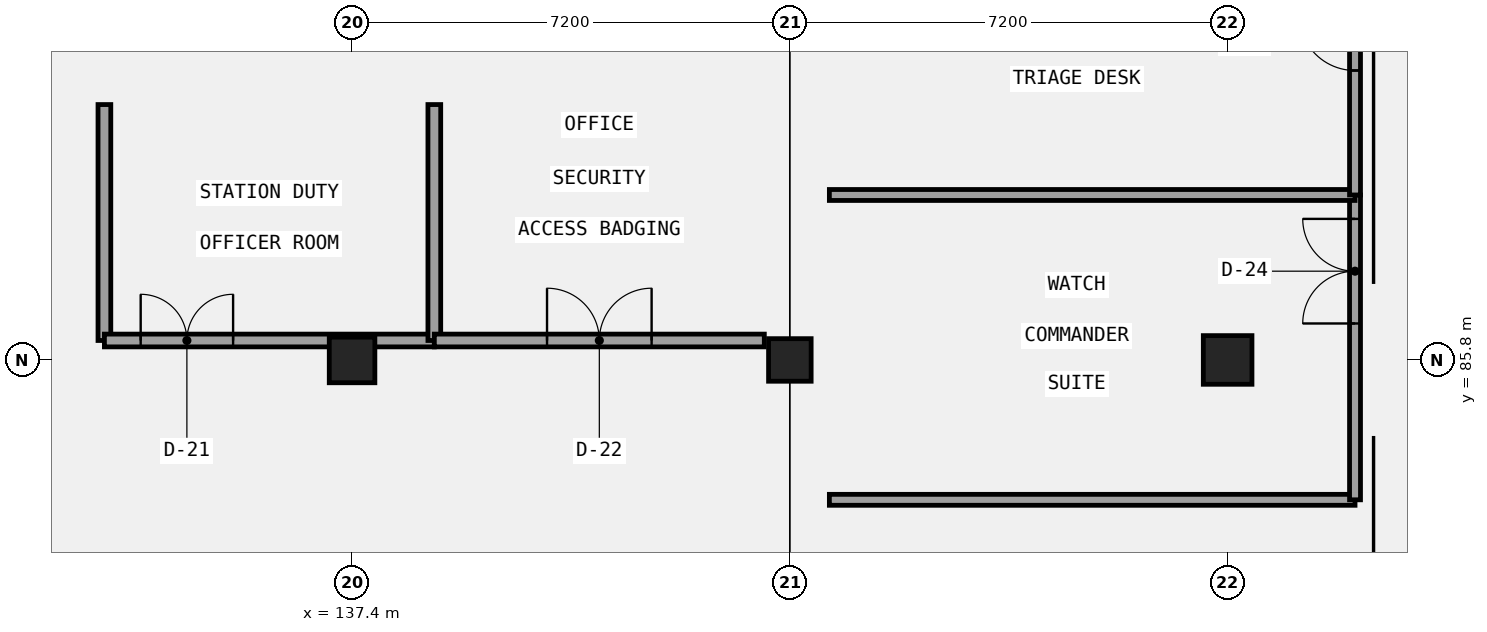
"""IFC4 building model, lengths in metres.
Left out: names, types, materials, properties, quantities, classifications, styles, units other than length and angle.
Written with IfcOpenShell. Run it as: python <this file> out.ifc"""

import sys

from ifc_helpers import new_model, si_unit, direction, frame, frame_2d, origin, origin_2d, place, context, subcontext, project, spatial, rectangle, extrude, element, fill, save


model = new_model("IFC4")
c1 = context("Model", 3, precision=1e-05, world=origin(), true_north=direction((0.0, 1.0)))
c2 = subcontext(c1, "Body", "Model", "MODEL_VIEW")
j1 = project(units=[si_unit("LENGTHUNIT", "METRE"), si_unit("PLANEANGLEUNIT", "RADIAN")], contexts=[c1])
p1 = place(None, origin())
s1 = spatial("IfcSite", under=j1, at=p1, CompositionType="ELEMENT")
p2 = place(p1, origin())
s2 = spatial("IfcBuilding", under=s1, at=p2, CompositionType="ELEMENT")
p3 = place(p2, origin())
s3 = spatial("IfcBuildingStorey", under=s2, at=p3, CompositionType="ELEMENT", Elevation=0.0)
p4 = place(p3, frame((137.4, 85.8, 0.0), z_axis=(0.0, 0.0, 1.0), x_axis=(1.0, 0.0, 0.0)))
e1 = element("IfcColumn", 1, at=p4, inside=s3, PredefinedType="COLUMN", context=c2, shape_type="SweptSolid", body=[
    extrude(rectangle(XDim=0.75, YDim=0.75, at=origin_2d()), origin(), (0.0, 0.0, 1.0), 5.4),
])
p5 = place(p3, frame((144.6, 85.8, 0.0), z_axis=(0.0, 0.0, 1.0), x_axis=(1.0, 0.0, 0.0)))
e2 = element("IfcColumn", 2, at=p5, inside=s3, PredefinedType="COLUMN", context=c2, shape_type="SweptSolid", body=[
    extrude(rectangle(XDim=0.7, YDim=0.7, at=origin_2d()), origin(), (0.0, 0.0, 1.0), 5.4),
])
p6 = place(p3, frame((151.8, 85.8, 0.0), z_axis=(0.0, 0.0, 1.0), x_axis=(1.0, 0.0, 0.0)))
e3 = element("IfcColumn", 3, at=p6, inside=s3, PredefinedType="COLUMN", context=c2, shape_type="SweptSolid", body=[
    extrude(rectangle(XDim=0.8, YDim=0.8, at=origin_2d()), origin(), (0.0, 0.0, 1.0), 5.4),
])
p7 = place(p3, frame((133.327, 86.12, 0.0), z_axis=(0.0, 0.0, 1.0), x_axis=(0.0, 1.0, 0.0)))
e4 = element("IfcWall", 4, at=p7, inside=s3, PredefinedType="PARTITIONING", context=c2, shape_type="SweptSolid", body=[
    extrude(rectangle(XDim=3.88, YDim=0.21, at=frame_2d((1.94, 0.0))), origin(), (0.0, 0.0, 1.0), 5.12),
])
p8 = place(p3, frame((133.327, 86.12, 0.0), z_axis=(0.0, 0.0, 1.0), x_axis=(1.0, 0.0, 0.0)))
e5 = element("IfcWall", 5, at=p8, inside=s3, PredefinedType="PARTITIONING", context=c2, shape_type="SweptSolid", body=[
    extrude(rectangle(XDim=5.426, YDim=0.21, at=frame_2d((2.713, 0.0))), origin(), (0.0, 0.0, 1.0), 4.27),
])
p9 = place(p8, frame((0.596, 0.0, 0.0)))
e6 = element("IfcOpeningElement", 6, at=p9, cuts=e5, PredefinedType="OPENING", context=c2, shape_type="SweptSolid", body=[
    extrude(rectangle(XDim=1.52, YDim=2.35, at=frame_2d((0.76, 1.175))), frame((0.0, 0.115, 0.0), z_axis=(0.0, -1.0, 0.0), x_axis=(1.0, 0.0, 0.0)), (0.0, 0.0, 1.0), 0.23),
])
p10 = place(p3, frame((138.753, 86.12, 0.0), z_axis=(0.0, 0.0, 1.0), x_axis=(0.0, 1.0, 0.0)))
e7 = element("IfcWall", 7, at=p10, inside=s3, PredefinedType="PARTITIONING", context=c2, shape_type="SweptSolid", body=[
    extrude(rectangle(XDim=3.88, YDim=0.21, at=frame_2d((1.94, 0.0))), origin(), (0.0, 0.0, 1.0), 5.12),
])
p11 = place(p3, frame((138.753, 86.12, 0.0), z_axis=(0.0, 0.0, 1.0), x_axis=(1.0, 0.0, 0.0)))
e8 = element("IfcWall", 8, at=p11, inside=s3, PredefinedType="PARTITIONING", context=c2, shape_type="SweptSolid", body=[
    extrude(rectangle(XDim=5.427, YDim=0.21, at=frame_2d((2.713, 0.0))), origin(), (0.0, 0.0, 1.0), 4.27),
])
p12 = place(p11, frame((1.854, 0.0, 0.0)))
e9 = element("IfcOpeningElement", 9, at=p12, cuts=e8, PredefinedType="OPENING", context=c2, shape_type="SweptSolid", body=[
    extrude(rectangle(XDim=1.72, YDim=2.1, at=frame_2d((0.86, 1.05))), frame((0.0, 0.115, 0.0), z_axis=(0.0, -1.0, 0.0), x_axis=(1.0, 0.0, 0.0)), (0.0, 0.0, 1.0), 0.23),
])
p13 = place(p3, frame((145.25, 83.5, 0.0), z_axis=(0.0, 0.0, 1.0), x_axis=(1.0, 0.0, 0.0)))
e10 = element("IfcWall", 10, at=p13, inside=s3, PredefinedType="PARTITIONING", context=c2, shape_type="SweptSolid", body=[
    extrude(rectangle(XDim=8.645, YDim=0.18, at=frame_2d((4.323, 0.0))), origin(), (0.0, 0.0, 1.0), 5.12),
])
p14 = place(p3, frame((153.895, 83.5, 0.0), z_axis=(0.0, 0.0, 1.0), x_axis=(0.0, 1.0, 0.0)))
e11 = element("IfcWall", 11, at=p14, inside=s3, PredefinedType="PARTITIONING", context=c2, shape_type="SweptSolid", body=[
    extrude(rectangle(XDim=5.013, YDim=0.18, at=frame_2d((2.506, 0.0))), origin(), (0.0, 0.0, 1.0), 5.12),
])
p15 = place(p14, frame((2.9, 0.0, 0.0)))
e12 = element("IfcOpeningElement", 12, at=p15, cuts=e11, PredefinedType="OPENING", context=c2, shape_type="SweptSolid", body=[
    extrude(rectangle(XDim=1.72, YDim=2.35, at=frame_2d((0.86, 1.175))), frame((0.0, 0.1, 0.0), z_axis=(0.0, -1.0, 0.0), x_axis=(1.0, 0.0, 0.0)), (0.0, 0.0, 1.0), 0.2),
])
p16 = place(p3, frame((145.25, 88.513, 0.0), z_axis=(0.0, 0.0, 1.0), x_axis=(1.0, 0.0, 0.0)))
e13 = element("IfcWall", 13, at=p16, inside=s3, PredefinedType="PARTITIONING", context=c2, shape_type="SweptSolid", body=[
    extrude(rectangle(XDim=8.645, YDim=0.18, at=frame_2d((4.323, 0.0))), origin(), (0.0, 0.0, 1.0), 5.12),
])
p17 = place(p3, frame((153.895, 88.513, 0.0), z_axis=(0.0, 0.0, 1.0), x_axis=(0.0, 1.0, 0.0)))
e14 = element("IfcWall", 14, at=p17, inside=s3, PredefinedType="PARTITIONING", context=c2, shape_type="SweptSolid", body=[
    extrude(rectangle(XDim=5.014, YDim=0.18, at=frame_2d((2.507, 0.0))), origin(), (0.0, 0.0, 1.0), 5.12),
])
p18 = place(p17, frame((2.047, 0.0, 0.0)))
e15 = element("IfcOpeningElement", 15, at=p18, cuts=e14, PredefinedType="OPENING", context=c2, shape_type="SweptSolid", body=[
    extrude(rectangle(XDim=0.92, YDim=2.1, at=frame_2d((0.46, 1.05))), frame((0.0, 0.1, 0.0), z_axis=(0.0, -1.0, 0.0), x_axis=(1.0, 0.0, 0.0)), (0.0, 0.0, 1.0), 0.2),
])
p19 = place(p9, origin())
e16 = element("IfcDoor", 16, at=p19, inside=s3, OperationType="DOUBLE_DOOR_SINGLE_SWING", PredefinedType="DOOR", context=c2, shape_type="SweptSolid", body=[
    extrude(rectangle(XDim=1.52, YDim=2.35, at=frame_2d((0.76, 1.175))), frame((0.0, 0.025, 0.0), z_axis=(0.0, -1.0, 0.0), x_axis=(1.0, 0.0, 0.0)), (0.0, 0.0, 1.0), 0.05),
])
fill(e6, e16)
p20 = place(p12, origin())
e17 = element("IfcDoor", 17, at=p20, inside=s3, OperationType="DOUBLE_DOOR_SINGLE_SWING", PredefinedType="DOOR", context=c2, shape_type="SweptSolid", body=[
    extrude(rectangle(XDim=1.72, YDim=2.1, at=frame_2d((0.86, 1.05))), frame((0.0, 0.025, 0.0), z_axis=(0.0, -1.0, 0.0), x_axis=(1.0, 0.0, 0.0)), (0.0, 0.0, 1.0), 0.05),
])
fill(e9, e17)
p21 = place(p15, frame((1.72, 0.0, 0.0), z_axis=(0.0, 0.0, 1.0), x_axis=(-1.0, 0.0, 0.0)))
e18 = element("IfcDoor", 18, at=p21, inside=s3, OperationType="DOUBLE_DOOR_SINGLE_SWING", PredefinedType="DOOR", context=c2, shape_type="SweptSolid", body=[
    extrude(rectangle(XDim=1.72, YDim=2.35, at=frame_2d((0.86, 1.175))), frame((0.0, 0.025, 0.0), z_axis=(0.0, -1.0, 0.0), x_axis=(1.0, 0.0, 0.0)), (0.0, 0.0, 1.0), 0.05),
])
fill(e12, e18)
p22 = place(p18, frame((0.92, 0.0, 0.0), z_axis=(0.0, 0.0, 1.0), x_axis=(-1.0, 0.0, 0.0)))
e19 = element("IfcDoor", 19, at=p22, inside=s3, OperationType="SINGLE_SWING_RIGHT", PredefinedType="DOOR", context=c2, shape_type="SweptSolid", body=[
    extrude(rectangle(XDim=0.92, YDim=2.1, at=frame_2d((0.46, 1.05))), frame((0.0, 0.025, 0.0), z_axis=(0.0, -1.0, 0.0), x_axis=(1.0, 0.0, 0.0)), (0.0, 0.0, 1.0), 0.05),
])
fill(e15, e19)
save(model, sys.argv[1])
